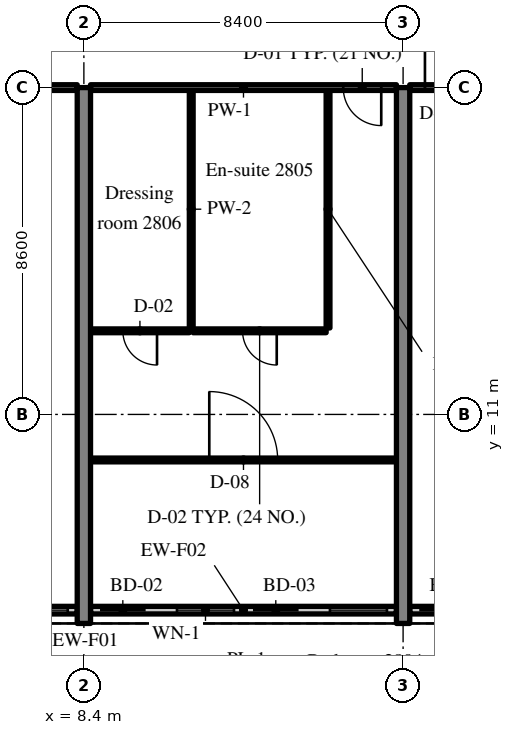
"""IFC4 building model, lengths in metres.
Left out: names, types, materials, properties, quantities, classifications, styles, units other than length and angle.
Written with IfcOpenShell. Run it as: python <this file> out.ifc"""

import sys

from ifc_helpers import new_model, si_unit, direction, frame, frame_2d, origin, place, context, subcontext, project, spatial, rectangle, extrude, source, transform, mapped, element, fill, save


model = new_model("IFC4")
c1 = context("Model", 3, precision=1e-05, world=origin(), true_north=direction((0.0, 1.0)))
c2 = subcontext(c1, "Body", "Model", "MODEL_VIEW")
j1 = project(units=[si_unit("LENGTHUNIT", "METRE"), si_unit("PLANEANGLEUNIT", "RADIAN")], contexts=[c1])
p1 = place(None, origin())
s1 = spatial("IfcSite", under=j1, at=p1, CompositionType="ELEMENT")
p2 = place(p1, origin())
s2 = spatial("IfcBuilding", under=s1, at=p2, CompositionType="ELEMENT")
p3 = place(p2, frame((0.0, 0.0, 118.0)))
s3 = spatial("IfcBuildingStorey", under=s2, at=p3, CompositionType="ELEMENT", Elevation=118.0)
m1 = source(origin(), c2, "Body", "SweptSolid", [
    extrude(rectangle(XDim=14.1, YDim=0.35, at=frame_2d((7.05, 0.0))), origin(), (0.0, 0.0, 1.0), 3.52),
])
for number, where, z_axis, x_axis in (
    (1, (8.4, 5.5, 0.0), (0.0, 0.0, 1.0), (0.0, 1.0, 0.0)),
    (2, (16.8, 5.5, 0.0), (0.0, 0.0, 1.0), (0.0, 1.0, 0.0)),
):
    element("IfcWall", number, at=place(p3, frame(where, z_axis=z_axis, x_axis=x_axis)), inside=s3, PredefinedType="SHEAR", context=c2, shape_type="MappedRepresentation", body=[
        mapped(m1, transform((0.0, 0.0, 0.0), scale=1.0)),
    ])
m2 = source(origin(), c2, "Body", "SweptSolid", [
    extrude(rectangle(XDim=4.08, YDim=0.2, at=frame_2d((2.04, 0.0))), origin(), (0.0, 0.0, 1.0), 2.82),
])
p4 = place(p3, frame((4.145, 5.85, 0.0), z_axis=(0.0, 0.0, 1.0), x_axis=(1.0, 0.0, 0.0)))
e3 = element("IfcWall", 3, at=p4, inside=s3, PredefinedType="SOLIDWALL", context=c2, shape_type="MappedRepresentation", body=[
    mapped(m2, transform((0.0, 0.0, 0.0), scale=1.0)),
])
m3 = source(origin(), c2, "Body", "SweptSolid", [
    extrude(rectangle(XDim=1.2, YDim=2.4, at=frame_2d((0.6, 1.2))), frame((0.0, 0.11, 0.0), z_axis=(0.0, -1.0, 0.0), x_axis=(1.0, 0.0, 0.0)), (0.0, 0.0, 1.0), 0.22),
])
p5 = place(p4, frame((0.25, 0.0, 0.0)))
e4 = element("IfcOpeningElement", 4, at=p5, cuts=e3, PredefinedType="OPENING", context=c2, shape_type="MappedRepresentation", body=[
    mapped(m3, transform((0.0, 0.0, 0.0), scale=1.0)),
])
m4 = source(origin(), c2, "Body", "SweptSolid", [
    extrude(rectangle(XDim=1.5, YDim=1.5, at=frame_2d((0.75, 0.75))), frame((0.0, 0.11, 0.0), z_axis=(0.0, -1.0, 0.0), x_axis=(1.0, 0.0, 0.0)), (0.0, 0.0, 1.0), 0.22),
])
p6 = place(p4, frame((2.33, 0.0, 0.9)))
e5 = element("IfcOpeningElement", 5, at=p6, cuts=e3, PredefinedType="OPENING", context=c2, shape_type="MappedRepresentation", body=[
    mapped(m4, transform((0.0, 0.0, 0.0), scale=1.0)),
])
m5 = source(origin(), c2, "Body", "SweptSolid", [
    extrude(rectangle(XDim=8.05, YDim=0.2, at=frame_2d((4.025, 0.0))), origin(), (0.0, 0.0, 1.0), 2.82),
])
p7 = place(p3, frame((8.575, 5.85, 0.0), z_axis=(0.0, 0.0, 1.0), x_axis=(1.0, 0.0, 0.0)))
e6 = element("IfcWall", 6, at=p7, inside=s3, PredefinedType="SOLIDWALL", context=c2, shape_type="MappedRepresentation", body=[
    mapped(m5, transform((0.0, 0.0, 0.0), scale=1.0)),
])
p8 = place(p7, frame((0.25, 0.0, 0.0)))
e7 = element("IfcOpeningElement", 7, at=p8, cuts=e6, PredefinedType="OPENING", context=c2, shape_type="MappedRepresentation", body=[
    mapped(m3, transform((0.0, 0.0, 0.0), scale=1.0)),
])
p9 = place(p7, frame((2.275, 0.0, 0.9)))
e8 = element("IfcOpeningElement", 8, at=p9, cuts=e6, PredefinedType="OPENING", context=c2, shape_type="MappedRepresentation", body=[
    mapped(m4, transform((0.0, 0.0, 0.0), scale=1.0)),
])
p10 = place(p7, frame((4.275, 0.0, 0.0)))
e9 = element("IfcOpeningElement", 9, at=p10, cuts=e6, PredefinedType="OPENING", context=c2, shape_type="MappedRepresentation", body=[
    mapped(m3, transform((0.0, 0.0, 0.0), scale=1.0)),
])
p11 = place(p7, frame((6.3, 0.0, 0.9)))
e10 = element("IfcOpeningElement", 10, at=p11, cuts=e6, PredefinedType="OPENING", context=c2, shape_type="MappedRepresentation", body=[
    mapped(m4, transform((0.0, 0.0, 0.0), scale=1.0)),
])
m6 = source(origin(), c2, "Body", "SweptSolid", [
    extrude(rectangle(XDim=8.05, YDim=0.2, at=frame_2d((4.025, 0.0))), origin(), (0.0, 0.0, 1.0), 2.82),
])
p12 = place(p3, frame((16.975, 5.85, 0.0), z_axis=(0.0, 0.0, 1.0), x_axis=(1.0, 0.0, 0.0)))
e11 = element("IfcWall", 11, at=p12, inside=s3, PredefinedType="SOLIDWALL", context=c2, shape_type="MappedRepresentation", body=[
    mapped(m6, transform((0.0, 0.0, 0.0), scale=1.0)),
])
p13 = place(p12, frame((0.25, 0.0, 0.0)))
e12 = element("IfcOpeningElement", 12, at=p13, cuts=e11, PredefinedType="OPENING", context=c2, shape_type="MappedRepresentation", body=[
    mapped(m3, transform((0.0, 0.0, 0.0), scale=1.0)),
])
p14 = place(p12, frame((2.275, 0.0, 0.9)))
e13 = element("IfcOpeningElement", 13, at=p14, cuts=e11, PredefinedType="OPENING", context=c2, shape_type="MappedRepresentation", body=[
    mapped(m4, transform((0.0, 0.0, 0.0), scale=1.0)),
])
p15 = place(p12, frame((4.275, 0.0, 0.0)))
e14 = element("IfcOpeningElement", 14, at=p15, cuts=e11, PredefinedType="OPENING", context=c2, shape_type="MappedRepresentation", body=[
    mapped(m3, transform((0.0, 0.0, 0.0), scale=1.0)),
])
p16 = place(p12, frame((6.3, 0.0, 0.9)))
e15 = element("IfcOpeningElement", 15, at=p16, cuts=e11, PredefinedType="OPENING", context=c2, shape_type="MappedRepresentation", body=[
    mapped(m4, transform((0.0, 0.0, 0.0), scale=1.0)),
])
m7 = source(origin(), c2, "Body", "SweptSolid", [
    extrude(rectangle(XDim=7.875, YDim=0.15, at=frame_2d((3.938, 0.0))), origin(), (0.0, 0.0, 1.0), 2.82),
])
p17 = place(p3, frame((0.35, 19.6, 0.0), z_axis=(0.0, 0.0, 1.0), x_axis=(1.0, 0.0, 0.0)))
e16 = element("IfcWall", 16, at=p17, inside=s3, PredefinedType="PARTITIONING", context=c2, shape_type="MappedRepresentation", body=[
    mapped(m7, transform((0.0, 0.0, 0.0), scale=1.0)),
])
m8 = source(origin(), c2, "Body", "SweptSolid", [
    extrude(rectangle(XDim=1.8, YDim=2.1, at=frame_2d((0.9, 1.05))), frame((0.0, 0.085, 0.0), z_axis=(0.0, -1.0, 0.0), x_axis=(1.0, 0.0, 0.0)), (0.0, 0.0, 1.0), 0.17),
])
p18 = place(p17, frame((3.037, 0.0, 0.0)))
e17 = element("IfcOpeningElement", 17, at=p18, cuts=e16, PredefinedType="OPENING", context=c2, shape_type="MappedRepresentation", body=[
    mapped(m8, transform((0.0, 0.0, 0.0), scale=1.0)),
])
m9 = source(origin(), c2, "Body", "SweptSolid", [
    extrude(rectangle(XDim=6.25, YDim=0.1, at=frame_2d((3.125, 0.0))), origin(), (0.0, 0.0, 1.0), 3.52),
])
for number, where, z_axis, x_axis in (
    (18, (14.825, 13.275, 0.0), (0.0, 0.0, 1.0), (0.0, 1.0, 0.0)),
    (19, (11.225, 13.275, 0.0), (0.0, 0.0, 1.0), (0.0, 1.0, 0.0)),
):
    element("IfcWall", number, at=place(p3, frame(where, z_axis=z_axis, x_axis=x_axis)), inside=s3, PredefinedType="PARTITIONING", context=c2, shape_type="MappedRepresentation", body=[
        mapped(m9, transform((0.0, 0.0, 0.0), scale=1.0)),
    ])
m10 = source(origin(), c2, "Body", "SweptSolid", [
    extrude(rectangle(XDim=3.5, YDim=0.1, at=frame_2d((1.75, 0.0))), origin(), (0.0, 0.0, 1.0), 3.52),
])
p19 = place(p3, frame((11.275, 13.2, 0.0), z_axis=(0.0, 0.0, 1.0), x_axis=(1.0, 0.0, 0.0)))
e20 = element("IfcWall", 20, at=p19, inside=s3, PredefinedType="PARTITIONING", context=c2, shape_type="MappedRepresentation", body=[
    mapped(m10, transform((0.0, 0.0, 0.0), scale=1.0)),
])
m11 = source(origin(), c2, "Body", "SweptSolid", [
    extrude(rectangle(XDim=0.9, YDim=2.1, at=frame_2d((0.45, 1.05))), frame((0.0, 0.06, 0.0), z_axis=(0.0, -1.0, 0.0), x_axis=(1.0, 0.0, 0.0)), (0.0, 0.0, 1.0), 0.12),
])
p20 = place(p19, frame((1.3, 0.0, 0.0)))
e21 = element("IfcOpeningElement", 21, at=p20, cuts=e20, PredefinedType="OPENING", context=c2, shape_type="MappedRepresentation", body=[
    mapped(m11, transform((0.0, 0.0, 0.0), scale=1.0)),
])
m12 = source(origin(), c2, "Body", "SweptSolid", [
    extrude(rectangle(XDim=2.6, YDim=0.1, at=frame_2d((1.3, 0.0))), origin(), (0.0, 0.0, 1.0), 3.52),
])
p21 = place(p3, frame((8.575, 13.2, 0.0), z_axis=(0.0, 0.0, 1.0), x_axis=(1.0, 0.0, 0.0)))
e22 = element("IfcWall", 22, at=p21, inside=s3, PredefinedType="PARTITIONING", context=c2, shape_type="MappedRepresentation", body=[
    mapped(m12, transform((0.0, 0.0, 0.0), scale=1.0)),
])
p22 = place(p21, frame((0.85, 0.0, 0.0)))
e23 = element("IfcOpeningElement", 23, at=p22, cuts=e22, PredefinedType="OPENING", context=c2, shape_type="MappedRepresentation", body=[
    mapped(m11, transform((0.0, 0.0, 0.0), scale=1.0)),
])
m13 = source(origin(), c2, "Body", "SweptSolid", [
    extrude(rectangle(XDim=8.05, YDim=0.1, at=frame_2d((4.025, 0.0))), origin(), (0.0, 0.0, 1.0), 3.52),
])
p23 = place(p3, frame((8.575, 9.802, 0.0), z_axis=(0.0, 0.0, 1.0), x_axis=(1.0, 0.0, 0.0)))
e24 = element("IfcWall", 24, at=p23, inside=s3, PredefinedType="PARTITIONING", context=c2, shape_type="MappedRepresentation", body=[
    mapped(m13, transform((0.0, 0.0, 0.0), scale=1.0)),
])
m14 = source(origin(), c2, "Body", "SweptSolid", [
    extrude(rectangle(XDim=1.8, YDim=2.1, at=frame_2d((0.9, 1.05))), frame((0.0, 0.06, 0.0), z_axis=(0.0, -1.0, 0.0), x_axis=(1.0, 0.0, 0.0)), (0.0, 0.0, 1.0), 0.12),
])
p24 = place(p23, frame((3.125, 0.0, 0.0)))
e25 = element("IfcOpeningElement", 25, at=p24, cuts=e24, PredefinedType="OPENING", context=c2, shape_type="MappedRepresentation", body=[
    mapped(m14, transform((0.0, 0.0, 0.0), scale=1.0)),
])
m15 = source(origin(), c2, "Body", "SweptSolid", [
    extrude(rectangle(XDim=8.05, YDim=0.15, at=frame_2d((4.025, 0.0))), origin(), (0.0, 0.0, 1.0), 2.82),
])
p25 = place(p3, frame((8.575, 19.6, 0.0), z_axis=(0.0, 0.0, 1.0), x_axis=(1.0, 0.0, 0.0)))
e26 = element("IfcWall", 26, at=p25, inside=s3, PredefinedType="PARTITIONING", context=c2, shape_type="MappedRepresentation", body=[
    mapped(m15, transform((0.0, 0.0, 0.0), scale=1.0)),
])
m16 = source(origin(), c2, "Body", "SweptSolid", [
    extrude(rectangle(XDim=1.0, YDim=2.1, at=frame_2d((0.5, 1.05))), frame((0.0, 0.085, 0.0), z_axis=(0.0, -1.0, 0.0), x_axis=(1.0, 0.0, 0.0)), (0.0, 0.0, 1.0), 0.17),
])
p26 = place(p25, frame((6.65, 0.0, 0.0)))
e27 = element("IfcOpeningElement", 27, at=p26, cuts=e26, PredefinedType="OPENING", context=c2, shape_type="MappedRepresentation", body=[
    mapped(m16, transform((0.0, 0.0, 0.0), scale=1.0)),
])
m17 = source(origin(), c2, "Body", "SweptSolid", [
    extrude(rectangle(XDim=8.05, YDim=0.15, at=frame_2d((4.025, 0.0))), origin(), (0.0, 0.0, 1.0), 2.82),
])
p27 = place(p3, frame((16.975, 19.6, 0.0), z_axis=(0.0, 0.0, 1.0), x_axis=(1.0, 0.0, 0.0)))
e28 = element("IfcWall", 28, at=p27, inside=s3, PredefinedType="PARTITIONING", context=c2, shape_type="MappedRepresentation", body=[
    mapped(m17, transform((0.0, 0.0, 0.0), scale=1.0)),
])
p28 = place(p27, frame((0.4, 0.0, 0.0)))
e29 = element("IfcOpeningElement", 29, at=p28, cuts=e28, PredefinedType="OPENING", context=c2, shape_type="MappedRepresentation", body=[
    mapped(m16, transform((0.0, 0.0, 0.0), scale=1.0)),
])
m18 = source(origin(), c2, "Body", "SweptSolid", [
    extrude(rectangle(XDim=1.5, YDim=1.5, at=frame_2d((0.75, 0.75))), frame((0.0, 0.03, 0.0), z_axis=(0.0, -1.0, 0.0), x_axis=(1.0, 0.0, 0.0)), (0.0, 0.0, 1.0), 0.06),
])
p29 = place(p6, origin())
e30 = element("IfcWindow", 30, at=p29, inside=s3, PartitioningType="SINGLE_PANEL", PredefinedType="WINDOW", context=c2, shape_type="MappedRepresentation", body=[
    mapped(m18, transform((0.0, 0.0, 0.0), scale=1.0)),
])
fill(e5, e30)
m19 = source(origin(), c2, "Body", "SweptSolid", [
    extrude(rectangle(XDim=1.2, YDim=2.4, at=frame_2d((0.6, 1.2))), frame((0.0, 0.025, 0.0), z_axis=(0.0, -1.0, 0.0), x_axis=(1.0, 0.0, 0.0)), (0.0, 0.0, 1.0), 0.05),
])
p30 = place(p8, origin())
e31 = element("IfcDoor", 31, at=p30, inside=s3, OperationType="SLIDING_TO_RIGHT", PredefinedType="DOOR", context=c2, shape_type="MappedRepresentation", body=[
    mapped(m19, transform((0.0, 0.0, 0.0), scale=1.0)),
])
fill(e7, e31)
p31 = place(p9, origin())
e32 = element("IfcWindow", 32, at=p31, inside=s3, PartitioningType="SINGLE_PANEL", PredefinedType="WINDOW", context=c2, shape_type="MappedRepresentation", body=[
    mapped(m18, transform((0.0, 0.0, 0.0), scale=1.0)),
])
fill(e8, e32)
p32 = place(p10, origin())
e33 = element("IfcDoor", 33, at=p32, inside=s3, OperationType="SLIDING_TO_LEFT", PredefinedType="DOOR", context=c2, shape_type="MappedRepresentation", body=[
    mapped(m19, transform((0.0, 0.0, 0.0), scale=1.0)),
])
fill(e9, e33)
p33 = place(p11, origin())
e34 = element("IfcWindow", 34, at=p33, inside=s3, PartitioningType="SINGLE_PANEL", PredefinedType="WINDOW", context=c2, shape_type="MappedRepresentation", body=[
    mapped(m18, transform((0.0, 0.0, 0.0), scale=1.0)),
])
fill(e10, e34)
p34 = place(p13, origin())
e35 = element("IfcDoor", 35, at=p34, inside=s3, OperationType="SLIDING_TO_RIGHT", PredefinedType="DOOR", context=c2, shape_type="MappedRepresentation", body=[
    mapped(m19, transform((0.0, 0.0, 0.0), scale=1.0)),
])
fill(e12, e35)
m20 = source(origin(), c2, "Body", "SweptSolid", [
    extrude(rectangle(XDim=0.9, YDim=2.1, at=frame_2d((0.45, 1.05))), frame((0.0, 0.025, 0.0), z_axis=(0.0, -1.0, 0.0), x_axis=(1.0, 0.0, 0.0)), (0.0, 0.0, 1.0), 0.05),
])
p35 = place(p20, origin())
e36 = element("IfcDoor", 36, at=p35, inside=s3, OperationType="SINGLE_SWING_RIGHT", PredefinedType="DOOR", context=c2, shape_type="MappedRepresentation", body=[
    mapped(m20, transform((0.0, 0.0, 0.0), scale=1.0)),
])
fill(e21, e36)
p36 = place(p22, origin())
e37 = element("IfcDoor", 37, at=p36, inside=s3, OperationType="SINGLE_SWING_RIGHT", PredefinedType="DOOR", context=c2, shape_type="MappedRepresentation", body=[
    mapped(m20, transform((0.0, 0.0, 0.0), scale=1.0)),
])
fill(e23, e37)
m21 = source(origin(), c2, "Body", "SweptSolid", [
    extrude(rectangle(XDim=1.8, YDim=2.1, at=frame_2d((0.9, 1.05))), frame((0.0, 0.025, 0.0), z_axis=(0.0, -1.0, 0.0), x_axis=(1.0, 0.0, 0.0)), (0.0, 0.0, 1.0), 0.05),
])
p37 = place(p24, origin())
e38 = element("IfcDoor", 38, at=p37, inside=s3, OperationType="DOUBLE_DOOR_SINGLE_SWING", PredefinedType="DOOR", context=c2, shape_type="MappedRepresentation", body=[
    mapped(m21, transform((0.0, 0.0, 0.0), scale=1.0)),
])
fill(e25, e38)
m22 = source(origin(), c2, "Body", "SweptSolid", [
    extrude(rectangle(XDim=1.0, YDim=2.1, at=frame_2d((0.5, 1.05))), frame((0.0, 0.025, 0.0), z_axis=(0.0, -1.0, 0.0), x_axis=(1.0, 0.0, 0.0)), (0.0, 0.0, 1.0), 0.05),
])
p38 = place(p26, origin())
e39 = element("IfcDoor", 39, at=p38, inside=s3, OperationType="SINGLE_SWING_RIGHT", PredefinedType="DOOR", context=c2, shape_type="MappedRepresentation", body=[
    mapped(m22, transform((0.0, 0.0, 0.0), scale=1.0)),
])
fill(e27, e39)
p39 = place(p28, origin())
e40 = element("IfcDoor", 40, at=p39, inside=s3, OperationType="SINGLE_SWING_LEFT", PredefinedType="DOOR", context=c2, shape_type="MappedRepresentation", body=[
    mapped(m22, transform((0.0, 0.0, 0.0), scale=1.0)),
])
fill(e29, e40)
save(model, sys.argv[1])
